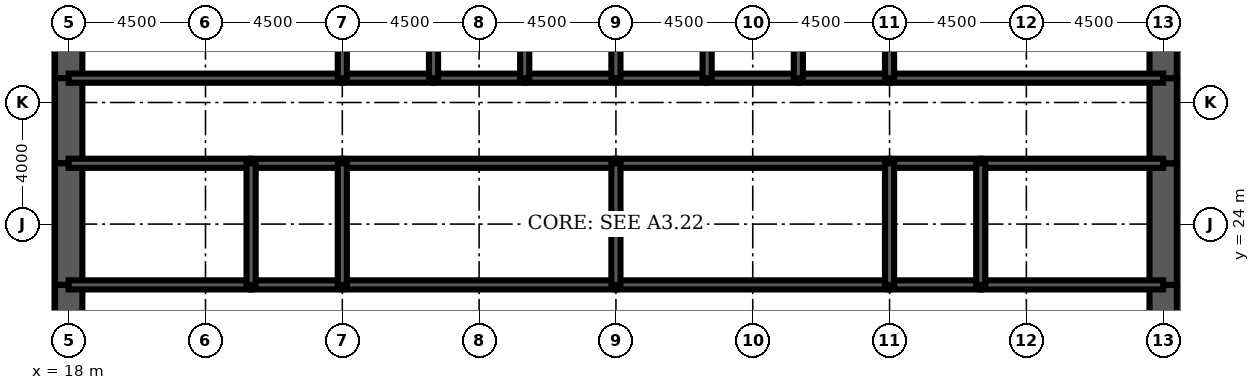
"""IFC4 building model, lengths in metres.
Left out: names, types, materials, properties, quantities, classifications, styles, units other than length and angle.
Written with IfcOpenShell. Run it as: python <this file> out.ifc"""

import sys

from ifc_helpers import new_model, si_unit, direction, frame, frame_2d, origin, place, context, subcontext, project, spatial, rectangle, extrude, element, fill, save


model = new_model("IFC4")
c1 = context("Model", 3, precision=1e-05, world=origin(), true_north=direction((0.0, 1.0)))
c2 = subcontext(c1, "Body", "Model", "MODEL_VIEW")
j1 = project(units=[si_unit("LENGTHUNIT", "METRE"), si_unit("PLANEANGLEUNIT", "RADIAN")], contexts=[c1])
p1 = place(None, origin())
s1 = spatial("IfcSite", under=j1, at=p1, CompositionType="ELEMENT")
p2 = place(p1, origin())
s2 = spatial("IfcBuilding", under=s1, at=p2, CompositionType="ELEMENT")
p3 = place(p2, frame((0.0, 0.0, 95.0)))
s3 = spatial("IfcBuildingStorey", under=s2, at=p3, CompositionType="ELEMENT", Elevation=95.0)
p4 = place(p3, frame((18.0, 32.0, 0.0), z_axis=(0.0, 0.0, 1.0), x_axis=(0.0, -1.0, 0.0)))
e1 = element("IfcWall", 1, at=p4, inside=s3, PredefinedType="SHEAR", context=c2, shape_type="SweptSolid", body=[
    extrude(rectangle(XDim=3.2, YDim=0.9, at=frame_2d((1.6, 0.0))), origin(), (0.0, 0.0, 1.0), 5.5),
])
p5 = place(p3, frame((18.0, 28.8, 0.0), z_axis=(0.0, 0.0, 1.0), x_axis=(0.0, -1.0, 0.0)))
e2 = element("IfcWall", 2, at=p5, inside=s3, PredefinedType="SHEAR", context=c2, shape_type="SweptSolid", body=[
    extrude(rectangle(XDim=2.8, YDim=0.9, at=frame_2d((1.4, 0.0))), origin(), (0.0, 0.0, 1.0), 5.5),
])
p6 = place(p5, frame((0.4, 0.0, 0.0)))
e3 = element("IfcOpeningElement", 3, at=p6, cuts=e2, PredefinedType="OPENING", context=c2, shape_type="SweptSolid", body=[
    extrude(rectangle(XDim=1.8, YDim=2.1, at=frame_2d((0.9, 1.05))), frame((0.0, 0.46, 0.0), z_axis=(0.0, -1.0, 0.0), x_axis=(1.0, 0.0, 0.0)), (0.0, 0.0, 1.0), 0.92),
])
p7 = place(p3, frame((18.0, 26.0, 0.0), z_axis=(0.0, 0.0, 1.0), x_axis=(0.0, -1.0, 0.0)))
e4 = element("IfcWall", 4, at=p7, inside=s3, PredefinedType="SHEAR", context=c2, shape_type="SweptSolid", body=[
    extrude(rectangle(XDim=4.0, YDim=0.9, at=frame_2d((2.0, 0.0))), origin(), (0.0, 0.0, 1.0), 5.5),
])
p8 = place(p3, frame((18.0, 22.0, 0.0), z_axis=(0.0, 0.0, 1.0), x_axis=(0.0, -1.0, 0.0)))
e5 = element("IfcWall", 5, at=p8, inside=s3, PredefinedType="SHEAR", context=c2, shape_type="SweptSolid", body=[
    extrude(rectangle(XDim=2.8, YDim=0.9, at=frame_2d((1.4, 0.0))), origin(), (0.0, 0.0, 1.0), 5.5),
])
p9 = place(p8, frame((0.6, 0.0, 0.0)))
e6 = element("IfcOpeningElement", 6, at=p9, cuts=e5, PredefinedType="OPENING", context=c2, shape_type="SweptSolid", body=[
    extrude(rectangle(XDim=1.8, YDim=2.1, at=frame_2d((0.9, 1.05))), frame((0.0, 0.46, 0.0), z_axis=(0.0, -1.0, 0.0), x_axis=(1.0, 0.0, 0.0)), (0.0, 0.0, 1.0), 0.92),
])
p10 = place(p3, frame((54.0, 19.2, 0.0), z_axis=(0.0, 0.0, 1.0), x_axis=(0.0, 1.0, 0.0)))
e7 = element("IfcWall", 7, at=p10, inside=s3, PredefinedType="SHEAR", context=c2, shape_type="SweptSolid", body=[
    extrude(rectangle(XDim=2.8, YDim=0.9, at=frame_2d((1.4, 0.0))), origin(), (0.0, 0.0, 1.0), 5.5),
])
p11 = place(p10, frame((0.4, 0.0, 0.0)))
e8 = element("IfcOpeningElement", 8, at=p11, cuts=e7, PredefinedType="OPENING", context=c2, shape_type="SweptSolid", body=[
    extrude(rectangle(XDim=1.8, YDim=2.1, at=frame_2d((0.9, 1.05))), frame((0.0, 0.46, 0.0), z_axis=(0.0, -1.0, 0.0), x_axis=(1.0, 0.0, 0.0)), (0.0, 0.0, 1.0), 0.92),
])
p12 = place(p3, frame((54.0, 22.0, 0.0), z_axis=(0.0, 0.0, 1.0), x_axis=(0.0, 1.0, 0.0)))
e9 = element("IfcWall", 9, at=p12, inside=s3, PredefinedType="SHEAR", context=c2, shape_type="SweptSolid", body=[
    extrude(rectangle(XDim=4.0, YDim=0.9, at=frame_2d((2.0, 0.0))), origin(), (0.0, 0.0, 1.0), 5.5),
])
p13 = place(p3, frame((54.0, 26.0, 0.0), z_axis=(0.0, 0.0, 1.0), x_axis=(0.0, 1.0, 0.0)))
e10 = element("IfcWall", 10, at=p13, inside=s3, PredefinedType="SHEAR", context=c2, shape_type="SweptSolid", body=[
    extrude(rectangle(XDim=2.8, YDim=0.9, at=frame_2d((1.4, 0.0))), origin(), (0.0, 0.0, 1.0), 5.5),
])
p14 = place(p13, frame((0.6, 0.0, 0.0)))
e11 = element("IfcOpeningElement", 11, at=p14, cuts=e10, PredefinedType="OPENING", context=c2, shape_type="SweptSolid", body=[
    extrude(rectangle(XDim=1.8, YDim=2.1, at=frame_2d((0.9, 1.05))), frame((0.0, 0.46, 0.0), z_axis=(0.0, -1.0, 0.0), x_axis=(1.0, 0.0, 0.0)), (0.0, 0.0, 1.0), 0.92),
])
p15 = place(p3, frame((54.0, 28.8, 0.0), z_axis=(0.0, 0.0, 1.0), x_axis=(0.0, 1.0, 0.0)))
e12 = element("IfcWall", 12, at=p15, inside=s3, PredefinedType="SHEAR", context=c2, shape_type="SweptSolid", body=[
    extrude(rectangle(XDim=3.2, YDim=0.9, at=frame_2d((1.6, 0.0))), origin(), (0.0, 0.0, 1.0), 5.5),
])
p16 = place(p3, frame((18.0, 28.8, 0.0), z_axis=(0.0, 0.0, 1.0), x_axis=(1.0, 0.0, 0.0)))
e13 = element("IfcWall", 13, at=p16, inside=s3, PredefinedType="SOLIDWALL", context=c2, shape_type="SweptSolid", body=[
    extrude(rectangle(XDim=9.0, YDim=0.3, at=frame_2d((4.5, 0.0))), origin(), (0.0, 0.0, 1.0), 5.5),
])
p17 = place(p16, frame((0.65, 0.0, 0.0)))
e14 = element("IfcOpeningElement", 14, at=p17, cuts=e13, PredefinedType="OPENING", context=c2, shape_type="SweptSolid", body=[
    extrude(rectangle(XDim=1.0, YDim=2.1, at=frame_2d((0.5, 1.05))), frame((0.0, 0.16, 0.0), z_axis=(0.0, -1.0, 0.0), x_axis=(1.0, 0.0, 0.0)), (0.0, 0.0, 1.0), 0.32),
])
p18 = place(p3, frame((27.0, 28.8, 0.0), z_axis=(0.0, 0.0, 1.0), x_axis=(1.0, 0.0, 0.0)))
e15 = element("IfcWall", 15, at=p18, inside=s3, PredefinedType="SOLIDWALL", context=c2, shape_type="SweptSolid", body=[
    extrude(rectangle(XDim=3.0, YDim=0.3, at=frame_2d((1.5, 0.0))), origin(), (0.0, 0.0, 1.0), 5.5),
])
p19 = place(p18, frame((0.95, 0.0, 0.0)))
e16 = element("IfcOpeningElement", 16, at=p19, cuts=e15, PredefinedType="OPENING", context=c2, shape_type="SweptSolid", body=[
    extrude(rectangle(XDim=1.1, YDim=2.2, at=frame_2d((0.55, 1.1))), frame((0.0, 0.16, 0.0), z_axis=(0.0, -1.0, 0.0), x_axis=(1.0, 0.0, 0.0)), (0.0, 0.0, 1.0), 0.32),
])
for number, where, z_axis, x_axis in (
    (17, (30.0, 28.8, 0.0), (0.0, 0.0, 1.0), (1.0, 0.0, 0.0)),
    (18, (33.0, 28.8, 0.0), (0.0, 0.0, 1.0), (1.0, 0.0, 0.0)),
    (19, (36.0, 28.8, 0.0), (0.0, 0.0, 1.0), (1.0, 0.0, 0.0)),
    (20, (39.0, 28.8, 0.0), (0.0, 0.0, 1.0), (1.0, 0.0, 0.0)),
):
    element("IfcWall", number, at=place(p3, frame(where, z_axis=z_axis, x_axis=x_axis)), inside=s3, PredefinedType="SOLIDWALL", context=c2, shape_type="SweptSolid", body=[
        extrude(rectangle(XDim=3.0, YDim=0.3, at=frame_2d((1.5, 0.0))), origin(), (0.0, 0.0, 1.0), 5.5),
    ])
p20 = place(p3, frame((42.0, 28.8, 0.0), z_axis=(0.0, 0.0, 1.0), x_axis=(1.0, 0.0, 0.0)))
e21 = element("IfcWall", 21, at=p20, inside=s3, PredefinedType="SOLIDWALL", context=c2, shape_type="SweptSolid", body=[
    extrude(rectangle(XDim=3.0, YDim=0.3, at=frame_2d((1.5, 0.0))), origin(), (0.0, 0.0, 1.0), 5.5),
])
p21 = place(p20, frame((0.95, 0.0, 0.0)))
e22 = element("IfcOpeningElement", 22, at=p21, cuts=e21, PredefinedType="OPENING", context=c2, shape_type="SweptSolid", body=[
    extrude(rectangle(XDim=1.1, YDim=2.2, at=frame_2d((0.55, 1.1))), frame((0.0, 0.16, 0.0), z_axis=(0.0, -1.0, 0.0), x_axis=(1.0, 0.0, 0.0)), (0.0, 0.0, 1.0), 0.32),
])
p22 = place(p3, frame((45.0, 28.8, 0.0), z_axis=(0.0, 0.0, 1.0), x_axis=(1.0, 0.0, 0.0)))
e23 = element("IfcWall", 23, at=p22, inside=s3, PredefinedType="SOLIDWALL", context=c2, shape_type="SweptSolid", body=[
    extrude(rectangle(XDim=9.0, YDim=0.3, at=frame_2d((4.5, 0.0))), origin(), (0.0, 0.0, 1.0), 5.5),
])
p23 = place(p22, frame((7.35, 0.0, 0.0)))
e24 = element("IfcOpeningElement", 24, at=p23, cuts=e23, PredefinedType="OPENING", context=c2, shape_type="SweptSolid", body=[
    extrude(rectangle(XDim=1.0, YDim=2.1, at=frame_2d((0.5, 1.05))), frame((0.0, 0.16, 0.0), z_axis=(0.0, -1.0, 0.0), x_axis=(1.0, 0.0, 0.0)), (0.0, 0.0, 1.0), 0.32),
])
p24 = place(p3, frame((18.0, 22.0, 0.0), z_axis=(0.0, 0.0, 1.0), x_axis=(1.0, 0.0, 0.0)))
e25 = element("IfcWall", 25, at=p24, inside=s3, PredefinedType="SOLIDWALL", context=c2, shape_type="SweptSolid", body=[
    extrude(rectangle(XDim=6.0, YDim=0.3, at=frame_2d((3.0, 0.0))), origin(), (0.0, 0.0, 1.0), 5.5),
])
p25 = place(p24, frame((2.0, 0.0, 0.0)))
e26 = element("IfcOpeningElement", 26, at=p25, cuts=e25, PredefinedType="OPENING", context=c2, shape_type="SweptSolid", body=[
    extrude(rectangle(XDim=1.0, YDim=2.1, at=frame_2d((0.5, 1.05))), frame((0.0, 0.16, 0.0), z_axis=(0.0, -1.0, 0.0), x_axis=(1.0, 0.0, 0.0)), (0.0, 0.0, 1.0), 0.32),
])
p26 = place(p3, frame((24.0, 22.0, 0.0), z_axis=(0.0, 0.0, 1.0), x_axis=(1.0, 0.0, 0.0)))
e27 = element("IfcWall", 27, at=p26, inside=s3, PredefinedType="SOLIDWALL", context=c2, shape_type="SweptSolid", body=[
    extrude(rectangle(XDim=3.0, YDim=0.3, at=frame_2d((1.5, 0.0))), origin(), (0.0, 0.0, 1.0), 5.5),
])
p27 = place(p26, frame((1.0, 0.0, 0.0)))
e28 = element("IfcOpeningElement", 28, at=p27, cuts=e27, PredefinedType="OPENING", context=c2, shape_type="SweptSolid", body=[
    extrude(rectangle(XDim=1.0, YDim=2.1, at=frame_2d((0.5, 1.05))), frame((0.0, 0.16, 0.0), z_axis=(0.0, -1.0, 0.0), x_axis=(1.0, 0.0, 0.0)), (0.0, 0.0, 1.0), 0.32),
])
p28 = place(p3, frame((27.0, 22.0, 0.0), z_axis=(0.0, 0.0, 1.0), x_axis=(1.0, 0.0, 0.0)))
e29 = element("IfcWall", 29, at=p28, inside=s3, PredefinedType="SOLIDWALL", context=c2, shape_type="SweptSolid", body=[
    extrude(rectangle(XDim=9.0, YDim=0.3, at=frame_2d((4.5, 0.0))), origin(), (0.0, 0.0, 1.0), 5.5),
])
p29 = place(p28, frame((4.0, 0.0, 0.0)))
e30 = element("IfcOpeningElement", 30, at=p29, cuts=e29, PredefinedType="OPENING", context=c2, shape_type="SweptSolid", body=[
    extrude(rectangle(XDim=1.0, YDim=2.1, at=frame_2d((0.5, 1.05))), frame((0.0, 0.16, 0.0), z_axis=(0.0, -1.0, 0.0), x_axis=(1.0, 0.0, 0.0)), (0.0, 0.0, 1.0), 0.32),
])
p30 = place(p3, frame((36.0, 22.0, 0.0), z_axis=(0.0, 0.0, 1.0), x_axis=(1.0, 0.0, 0.0)))
e31 = element("IfcWall", 31, at=p30, inside=s3, PredefinedType="SOLIDWALL", context=c2, shape_type="SweptSolid", body=[
    extrude(rectangle(XDim=9.0, YDim=0.3, at=frame_2d((4.5, 0.0))), origin(), (0.0, 0.0, 1.0), 5.5),
])
p31 = place(p30, frame((4.0, 0.0, 0.0)))
e32 = element("IfcOpeningElement", 32, at=p31, cuts=e31, PredefinedType="OPENING", context=c2, shape_type="SweptSolid", body=[
    extrude(rectangle(XDim=1.0, YDim=2.1, at=frame_2d((0.5, 1.05))), frame((0.0, 0.16, 0.0), z_axis=(0.0, -1.0, 0.0), x_axis=(1.0, 0.0, 0.0)), (0.0, 0.0, 1.0), 0.32),
])
p32 = place(p3, frame((45.0, 22.0, 0.0), z_axis=(0.0, 0.0, 1.0), x_axis=(1.0, 0.0, 0.0)))
e33 = element("IfcWall", 33, at=p32, inside=s3, PredefinedType="SOLIDWALL", context=c2, shape_type="SweptSolid", body=[
    extrude(rectangle(XDim=3.0, YDim=0.3, at=frame_2d((1.5, 0.0))), origin(), (0.0, 0.0, 1.0), 5.5),
])
p33 = place(p32, frame((1.0, 0.0, 0.0)))
e34 = element("IfcOpeningElement", 34, at=p33, cuts=e33, PredefinedType="OPENING", context=c2, shape_type="SweptSolid", body=[
    extrude(rectangle(XDim=1.0, YDim=2.1, at=frame_2d((0.5, 1.05))), frame((0.0, 0.16, 0.0), z_axis=(0.0, -1.0, 0.0), x_axis=(1.0, 0.0, 0.0)), (0.0, 0.0, 1.0), 0.32),
])
p34 = place(p3, frame((48.0, 22.0, 0.0), z_axis=(0.0, 0.0, 1.0), x_axis=(1.0, 0.0, 0.0)))
e35 = element("IfcWall", 35, at=p34, inside=s3, PredefinedType="SOLIDWALL", context=c2, shape_type="SweptSolid", body=[
    extrude(rectangle(XDim=6.0, YDim=0.3, at=frame_2d((3.0, 0.0))), origin(), (0.0, 0.0, 1.0), 5.5),
])
p35 = place(p34, frame((2.0, 0.0, 0.0)))
e36 = element("IfcOpeningElement", 36, at=p35, cuts=e35, PredefinedType="OPENING", context=c2, shape_type="SweptSolid", body=[
    extrude(rectangle(XDim=1.0, YDim=2.1, at=frame_2d((0.5, 1.05))), frame((0.0, 0.16, 0.0), z_axis=(0.0, -1.0, 0.0), x_axis=(1.0, 0.0, 0.0)), (0.0, 0.0, 1.0), 0.32),
])
p36 = place(p34, frame((4.3, 0.0, 0.0)))
e37 = element("IfcOpeningElement", 37, at=p36, cuts=e35, PredefinedType="OPENING", context=c2, shape_type="SweptSolid", body=[
    extrude(rectangle(XDim=1.0, YDim=2.1, at=frame_2d((0.5, 1.05))), frame((0.0, 0.16, 0.0), z_axis=(0.0, -1.0, 0.0), x_axis=(1.0, 0.0, 0.0)), (0.0, 0.0, 1.0), 0.32),
])
p37 = place(p3, frame((18.0, 26.0, 0.0), z_axis=(0.0, 0.0, 1.0), x_axis=(1.0, 0.0, 0.0)))
e38 = element("IfcWall", 38, at=p37, inside=s3, PredefinedType="SOLIDWALL", context=c2, shape_type="SweptSolid", body=[
    extrude(rectangle(XDim=6.0, YDim=0.3, at=frame_2d((3.0, 0.0))), origin(), (0.0, 0.0, 1.0), 5.5),
])
p38 = place(p3, frame((24.0, 26.0, 0.0), z_axis=(0.0, 0.0, 1.0), x_axis=(1.0, 0.0, 0.0)))
e39 = element("IfcWall", 39, at=p38, inside=s3, PredefinedType="SOLIDWALL", context=c2, shape_type="SweptSolid", body=[
    extrude(rectangle(XDim=3.0, YDim=0.3, at=frame_2d((1.5, 0.0))), origin(), (0.0, 0.0, 1.0), 5.5),
])
for number, where, z_axis, x_axis in (
    (40, (27.0, 26.0, 0.0), (0.0, 0.0, 1.0), (1.0, 0.0, 0.0)),
    (41, (36.0, 26.0, 0.0), (0.0, 0.0, 1.0), (1.0, 0.0, 0.0)),
):
    element("IfcWall", number, at=place(p3, frame(where, z_axis=z_axis, x_axis=x_axis)), inside=s3, PredefinedType="SOLIDWALL", context=c2, shape_type="SweptSolid", body=[
        extrude(rectangle(XDim=9.0, YDim=0.3, at=frame_2d((4.5, 0.0))), origin(), (0.0, 0.0, 1.0), 5.5),
    ])
p39 = place(p3, frame((45.0, 26.0, 0.0), z_axis=(0.0, 0.0, 1.0), x_axis=(1.0, 0.0, 0.0)))
e42 = element("IfcWall", 42, at=p39, inside=s3, PredefinedType="SOLIDWALL", context=c2, shape_type="SweptSolid", body=[
    extrude(rectangle(XDim=3.0, YDim=0.3, at=frame_2d((1.5, 0.0))), origin(), (0.0, 0.0, 1.0), 5.5),
])
p40 = place(p3, frame((48.0, 26.0, 0.0), z_axis=(0.0, 0.0, 1.0), x_axis=(1.0, 0.0, 0.0)))
e43 = element("IfcWall", 43, at=p40, inside=s3, PredefinedType="SOLIDWALL", context=c2, shape_type="SweptSolid", body=[
    extrude(rectangle(XDim=6.0, YDim=0.3, at=frame_2d((3.0, 0.0))), origin(), (0.0, 0.0, 1.0), 5.5),
])
for number, where, z_axis, x_axis in (
    (44, (27.0, 28.8, 0.0), (0.0, 0.0, 1.0), (0.0, 1.0, 0.0)),
    (45, (30.0, 28.8, 0.0), (0.0, 0.0, 1.0), (0.0, 1.0, 0.0)),
    (46, (33.0, 28.8, 0.0), (0.0, 0.0, 1.0), (0.0, 1.0, 0.0)),
    (47, (36.0, 28.8, 0.0), (0.0, 0.0, 1.0), (0.0, 1.0, 0.0)),
    (48, (39.0, 28.8, 0.0), (0.0, 0.0, 1.0), (0.0, 1.0, 0.0)),
    (49, (42.0, 28.8, 0.0), (0.0, 0.0, 1.0), (0.0, 1.0, 0.0)),
    (50, (45.0, 28.8, 0.0), (0.0, 0.0, 1.0), (0.0, 1.0, 0.0)),
):
    element("IfcWall", number, at=place(p3, frame(where, z_axis=z_axis, x_axis=x_axis)), inside=s3, PredefinedType="SOLIDWALL", context=c2, shape_type="SweptSolid", body=[
        extrude(rectangle(XDim=3.2, YDim=0.3, at=frame_2d((1.6, 0.0))), origin(), (0.0, 0.0, 1.0), 5.5),
    ])
for number, where, z_axis, x_axis in (
    (51, (24.0, 22.0, 0.0), (0.0, 0.0, 1.0), (0.0, 1.0, 0.0)),
    (52, (27.0, 22.0, 0.0), (0.0, 0.0, 1.0), (0.0, 1.0, 0.0)),
    (53, (36.0, 22.0, 0.0), (0.0, 0.0, 1.0), (0.0, 1.0, 0.0)),
    (54, (45.0, 22.0, 0.0), (0.0, 0.0, 1.0), (0.0, 1.0, 0.0)),
    (55, (48.0, 22.0, 0.0), (0.0, 0.0, 1.0), (0.0, 1.0, 0.0)),
):
    element("IfcWall", number, at=place(p3, frame(where, z_axis=z_axis, x_axis=x_axis)), inside=s3, PredefinedType="SOLIDWALL", context=c2, shape_type="SweptSolid", body=[
        extrude(rectangle(XDim=4.0, YDim=0.3, at=frame_2d((2.0, 0.0))), origin(), (0.0, 0.0, 1.0), 5.5),
    ])
p41 = place(p3, frame((42.0, 22.15, 0.0), z_axis=(0.0, 0.0, 1.0), x_axis=(0.0, 1.0, 0.0)))
e56 = element("IfcWall", 56, at=p41, inside=s3, PredefinedType="PARTITIONING", context=c2, shape_type="SweptSolid", body=[
    extrude(rectangle(XDim=3.7, YDim=0.15, at=frame_2d((1.85, 0.0))), origin(), (0.0, 0.0, 1.0), 3.0),
])
p42 = place(p41, frame((2.2, 0.0, 0.0)))
e57 = element("IfcOpeningElement", 57, at=p42, cuts=e56, PredefinedType="OPENING", context=c2, shape_type="SweptSolid", body=[
    extrude(rectangle(XDim=1.0, YDim=2.1, at=frame_2d((0.5, 1.05))), frame((0.0, 0.085, 0.0), z_axis=(0.0, -1.0, 0.0), x_axis=(1.0, 0.0, 0.0)), (0.0, 0.0, 1.0), 0.17),
])
p43 = place(p3, frame((51.975, 22.15, 0.0), z_axis=(0.0, 0.0, 1.0), x_axis=(0.0, 1.0, 0.0)))
e58 = element("IfcWall", 58, at=p43, inside=s3, PredefinedType="PARTITIONING", context=c2, shape_type="SweptSolid", body=[
    extrude(rectangle(XDim=3.7, YDim=0.15, at=frame_2d((1.85, 0.0))), origin(), (0.0, 0.0, 1.0), 3.0),
])
p44 = place(p42, origin())
e59 = element("IfcDoor", 59, at=p44, inside=s3, OperationType="SINGLE_SWING_RIGHT", PredefinedType="DOOR", context=c2, shape_type="SweptSolid", body=[
    extrude(rectangle(XDim=1.0, YDim=2.1, at=frame_2d((0.5, 1.05))), frame((0.0, 0.025, 0.0), z_axis=(0.0, -1.0, 0.0), x_axis=(1.0, 0.0, 0.0)), (0.0, 0.0, 1.0), 0.05),
])
fill(e57, e59)
p45 = place(p21, origin())
e60 = element("IfcDoor", 60, at=p45, inside=s3, OperationType="DOUBLE_DOOR_SLIDING", PredefinedType="USERDEFINED", context=c2, shape_type="SweptSolid", body=[
    extrude(rectangle(XDim=1.1, YDim=2.2, at=frame_2d((0.55, 1.1))), frame((0.0, 0.025, 0.0), z_axis=(0.0, -1.0, 0.0), x_axis=(1.0, 0.0, 0.0)), (0.0, 0.0, 1.0), 0.05),
])
fill(e22, e60)
p46 = place(p19, origin())
e61 = element("IfcDoor", 61, at=p46, inside=s3, OperationType="DOUBLE_DOOR_SLIDING", PredefinedType="USERDEFINED", context=c2, shape_type="SweptSolid", body=[
    extrude(rectangle(XDim=1.1, YDim=2.2, at=frame_2d((0.55, 1.1))), frame((0.0, 0.025, 0.0), z_axis=(0.0, -1.0, 0.0), x_axis=(1.0, 0.0, 0.0)), (0.0, 0.0, 1.0), 0.05),
])
fill(e16, e61)
p47 = place(p17, origin())
e62 = element("IfcDoor", 62, at=p47, inside=s3, OperationType="SINGLE_SWING_LEFT", PredefinedType="DOOR", context=c2, shape_type="SweptSolid", body=[
    extrude(rectangle(XDim=1.0, YDim=2.1, at=frame_2d((0.5, 1.05))), frame((0.0, 0.025, 0.0), z_axis=(0.0, -1.0, 0.0), x_axis=(1.0, 0.0, 0.0)), (0.0, 0.0, 1.0), 0.05),
])
fill(e14, e62)
p48 = place(p23, origin())
e63 = element("IfcDoor", 63, at=p48, inside=s3, OperationType="SINGLE_SWING_RIGHT", PredefinedType="DOOR", context=c2, shape_type="SweptSolid", body=[
    extrude(rectangle(XDim=1.0, YDim=2.1, at=frame_2d((0.5, 1.05))), frame((0.0, 0.025, 0.0), z_axis=(0.0, -1.0, 0.0), x_axis=(1.0, 0.0, 0.0)), (0.0, 0.0, 1.0), 0.05),
])
fill(e24, e63)
p49 = place(p9, origin())
e64 = element("IfcDoor", 64, at=p49, inside=s3, OperationType="SINGLE_SWING_LEFT", PredefinedType="DOOR", context=c2, shape_type="SweptSolid", body=[
    extrude(rectangle(XDim=1.8, YDim=2.1, at=frame_2d((0.9, 1.05))), frame((0.0, 0.45, 0.0), z_axis=(0.0, -1.0, 0.0), x_axis=(1.0, 0.0, 0.0)), (0.0, 0.0, 1.0), 0.899),
])
fill(e6, e64)
p50 = place(p6, origin())
e65 = element("IfcDoor", 65, at=p50, inside=s3, OperationType="SINGLE_SWING_LEFT", PredefinedType="DOOR", context=c2, shape_type="SweptSolid", body=[
    extrude(rectangle(XDim=1.8, YDim=2.1, at=frame_2d((0.9, 1.05))), frame((0.0, 0.45, 0.0), z_axis=(0.0, -1.0, 0.0), x_axis=(1.0, 0.0, 0.0)), (0.0, 0.0, 1.0), 0.899),
])
fill(e3, e65)
p51 = place(p11, origin())
e66 = element("IfcDoor", 66, at=p51, inside=s3, OperationType="SINGLE_SWING_LEFT", PredefinedType="DOOR", context=c2, shape_type="SweptSolid", body=[
    extrude(rectangle(XDim=1.8, YDim=2.1, at=frame_2d((0.9, 1.05))), frame((0.0, 0.45, 0.0), z_axis=(0.0, -1.0, 0.0), x_axis=(1.0, 0.0, 0.0)), (0.0, 0.0, 1.0), 0.899),
])
fill(e8, e66)
p52 = place(p14, origin())
e67 = element("IfcDoor", 67, at=p52, inside=s3, OperationType="SINGLE_SWING_LEFT", PredefinedType="DOOR", context=c2, shape_type="SweptSolid", body=[
    extrude(rectangle(XDim=1.8, YDim=2.1, at=frame_2d((0.9, 1.05))), frame((0.0, 0.45, 0.0), z_axis=(0.0, -1.0, 0.0), x_axis=(1.0, 0.0, 0.0)), (0.0, 0.0, 1.0), 0.899),
])
fill(e11, e67)
p53 = place(p25, origin())
e68 = element("IfcDoor", 68, at=p53, inside=s3, OperationType="SINGLE_SWING_LEFT", PredefinedType="DOOR", context=c2, shape_type="SweptSolid", body=[
    extrude(rectangle(XDim=1.0, YDim=2.1, at=frame_2d((0.5, 1.05))), frame((0.0, 0.025, 0.0), z_axis=(0.0, -1.0, 0.0), x_axis=(1.0, 0.0, 0.0)), (0.0, 0.0, 1.0), 0.05),
])
fill(e26, e68)
p54 = place(p27, origin())
e69 = element("IfcDoor", 69, at=p54, inside=s3, OperationType="SINGLE_SWING_LEFT", PredefinedType="DOOR", context=c2, shape_type="SweptSolid", body=[
    extrude(rectangle(XDim=1.0, YDim=2.1, at=frame_2d((0.5, 1.05))), frame((0.0, 0.025, 0.0), z_axis=(0.0, -1.0, 0.0), x_axis=(1.0, 0.0, 0.0)), (0.0, 0.0, 1.0), 0.05),
])
fill(e28, e69)
p55 = place(p29, origin())
e70 = element("IfcDoor", 70, at=p55, inside=s3, OperationType="SINGLE_SWING_LEFT", PredefinedType="DOOR", context=c2, shape_type="SweptSolid", body=[
    extrude(rectangle(XDim=1.0, YDim=2.1, at=frame_2d((0.5, 1.05))), frame((0.0, 0.025, 0.0), z_axis=(0.0, -1.0, 0.0), x_axis=(1.0, 0.0, 0.0)), (0.0, 0.0, 1.0), 0.05),
])
fill(e30, e70)
p56 = place(p31, origin())
e71 = element("IfcDoor", 71, at=p56, inside=s3, OperationType="SINGLE_SWING_LEFT", PredefinedType="DOOR", context=c2, shape_type="SweptSolid", body=[
    extrude(rectangle(XDim=1.0, YDim=2.1, at=frame_2d((0.5, 1.05))), frame((0.0, 0.025, 0.0), z_axis=(0.0, -1.0, 0.0), x_axis=(1.0, 0.0, 0.0)), (0.0, 0.0, 1.0), 0.05),
])
fill(e32, e71)
p57 = place(p33, origin())
e72 = element("IfcDoor", 72, at=p57, inside=s3, OperationType="SINGLE_SWING_LEFT", PredefinedType="DOOR", context=c2, shape_type="SweptSolid", body=[
    extrude(rectangle(XDim=1.0, YDim=2.1, at=frame_2d((0.5, 1.05))), frame((0.0, 0.025, 0.0), z_axis=(0.0, -1.0, 0.0), x_axis=(1.0, 0.0, 0.0)), (0.0, 0.0, 1.0), 0.05),
])
fill(e34, e72)
p58 = place(p35, origin())
e73 = element("IfcDoor", 73, at=p58, inside=s3, OperationType="SINGLE_SWING_LEFT", PredefinedType="DOOR", context=c2, shape_type="SweptSolid", body=[
    extrude(rectangle(XDim=1.0, YDim=2.1, at=frame_2d((0.5, 1.05))), frame((0.0, 0.025, 0.0), z_axis=(0.0, -1.0, 0.0), x_axis=(1.0, 0.0, 0.0)), (0.0, 0.0, 1.0), 0.05),
])
fill(e36, e73)
p59 = place(p36, origin())
e74 = element("IfcDoor", 74, at=p59, inside=s3, OperationType="SINGLE_SWING_RIGHT", PredefinedType="DOOR", context=c2, shape_type="SweptSolid", body=[
    extrude(rectangle(XDim=1.0, YDim=2.1, at=frame_2d((0.5, 1.05))), frame((0.0, 0.025, 0.0), z_axis=(0.0, -1.0, 0.0), x_axis=(1.0, 0.0, 0.0)), (0.0, 0.0, 1.0), 0.05),
])
fill(e37, e74)
save(model, sys.argv[1])
